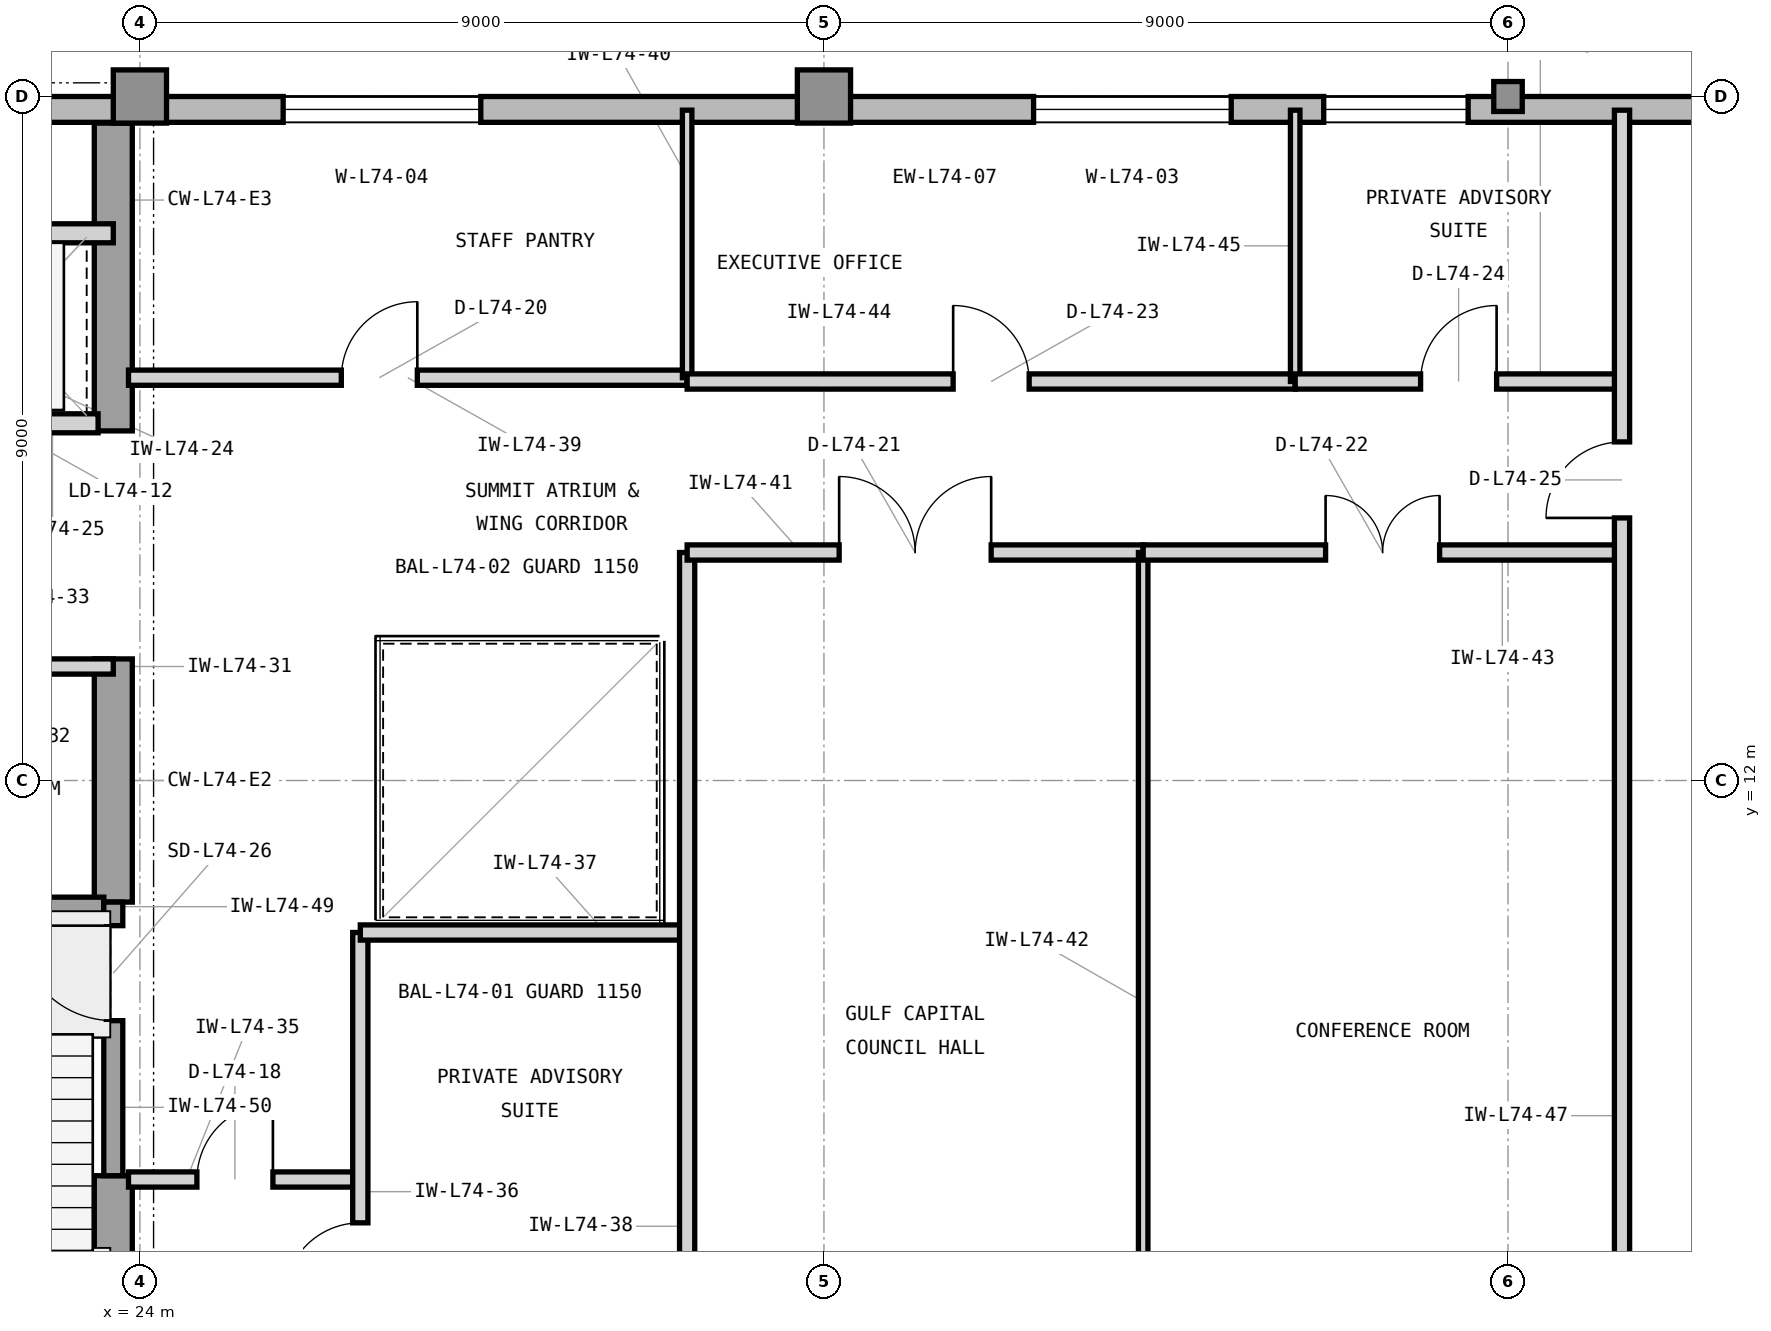
"""IFC4 building model, lengths in metres.
Left out: names, types, materials, properties, quantities, classifications, styles, units other than length and angle.
Written with IfcOpenShell. Run it as: python <this file> out.ifc"""

import sys

from ifc_helpers import new_model, si_unit, direction, frame, frame_2d, origin, origin_2d, place, context, subcontext, project, spatial, rectangle, i_section, extrude, element, fill, save


model = new_model("IFC4")
c1 = context("Model", 3, precision=1e-05, world=origin(), true_north=direction((0.0, 1.0)))
c2 = subcontext(c1, "Body", "Model", "MODEL_VIEW")
j1 = project(units=[si_unit("LENGTHUNIT", "METRE"), si_unit("PLANEANGLEUNIT", "RADIAN")], contexts=[c1])
p1 = place(None, origin())
s1 = spatial("IfcSite", under=j1, at=p1, CompositionType="ELEMENT")
p2 = place(p1, origin())
s2 = spatial("IfcBuilding", under=s1, at=p2, CompositionType="ELEMENT")
p3 = place(p2, frame((0.0, 0.0, 301.5)))
s3 = spatial("IfcBuildingStorey", under=s2, at=p3, CompositionType="ELEMENT", Elevation=301.5)
p4 = place(p3, frame((23.65, 3.6, 0.0), z_axis=(0.0, 0.0, 1.0), x_axis=(0.0, 1.0, 0.0)))
e1 = element("IfcWall", 1, at=p4, inside=s3, PredefinedType="SHEAR", context=c2, shape_type="SweptSolid", body=[
    extrude(rectangle(XDim=3.2, YDim=0.5, at=frame_2d((1.6, 0.0))), origin(), (0.0, 0.0, 1.0), 3.9),
])
p5 = place(p3, frame((23.65, 10.4, 0.0), z_axis=(0.0, 0.0, 1.0), x_axis=(0.0, 1.0, 0.0)))
e2 = element("IfcWall", 2, at=p5, inside=s3, PredefinedType="SHEAR", context=c2, shape_type="SweptSolid", body=[
    extrude(rectangle(XDim=3.2, YDim=0.5, at=frame_2d((1.6, 0.0))), origin(), (0.0, 0.0, 1.0), 3.9),
])
p6 = place(p3, frame((23.65, 16.6, 0.0), z_axis=(0.0, 0.0, 1.0), x_axis=(0.0, 1.0, 0.0)))
e3 = element("IfcWall", 3, at=p6, inside=s3, PredefinedType="SHEAR", context=c2, shape_type="SweptSolid", body=[
    extrude(rectangle(XDim=4.05, YDim=0.5, at=frame_2d((2.025, 0.0))), origin(), (0.0, 0.0, 1.0), 3.9),
])
for number, where, z_axis, x_axis in (
    (4, (24.0, 21.0, 0.0), (0.0, 0.0, 1.0), (1.0, 0.0, 0.0)),
    (5, (33.0, 21.0, 0.0), (0.0, 0.0, 1.0), (1.0, 0.0, 0.0)),
):
    element("IfcColumn", number, at=place(p3, frame(where, z_axis=z_axis, x_axis=x_axis)), inside=s3, PredefinedType="COLUMN", context=c2, shape_type="SweptSolid", body=[
        extrude(rectangle(XDim=0.7, YDim=0.7, at=origin_2d()), origin(), (0.0, 0.0, 1.0), 3.9),
    ])
p7 = place(p3, frame((42.0, 21.0, 0.0), z_axis=(0.0, 0.0, 1.0), x_axis=(1.0, 0.0, 0.0)))
e6 = element("IfcColumn", 6, at=p7, inside=s3, PredefinedType="COLUMN", context=c2, shape_type="SweptSolid", body=[
    extrude(i_section(OverallWidth=0.394, OverallDepth=0.375, WebThickness=0.017, FlangeThickness=0.028, FilletRadius=0.022, at=origin_2d()), origin(), (0.0, 0.0, 1.0), 3.9),
])
p8 = place(p3, frame((49.4, 20.83, 0.0), z_axis=(0.0, 0.0, 1.0), x_axis=(-1.0, 0.0, 0.0)))
e7 = element("IfcWall", 7, at=p8, inside=s3, PredefinedType="STANDARD", context=c2, shape_type="SweptSolid", body=[
    extrude(rectangle(XDim=29.62, YDim=0.34, at=frame_2d((14.81, 0.0))), origin(), (0.0, 0.0, 1.0), 3.715),
])
p9 = place(p8, frame((11.042, 0.0, 0.8)))
e8 = element("IfcOpeningElement", 8, at=p9, cuts=e7, PredefinedType="OPENING", context=c2, shape_type="SweptSolid", body=[
    extrude(rectangle(XDim=2.6, YDim=2.35, at=frame_2d((1.3, 1.175))), frame((0.0, 0.18, 0.0), z_axis=(0.0, -1.0, 0.0), x_axis=(1.0, 0.0, 0.0)), (0.0, 0.0, 1.0), 0.36),
])
p10 = place(p8, frame((20.915, 0.0, 0.8)))
e9 = element("IfcOpeningElement", 9, at=p10, cuts=e7, PredefinedType="OPENING", context=c2, shape_type="SweptSolid", body=[
    extrude(rectangle(XDim=2.6, YDim=2.35, at=frame_2d((1.3, 1.175))), frame((0.0, 0.18, 0.0), z_axis=(0.0, -1.0, 0.0), x_axis=(1.0, 0.0, 0.0)), (0.0, 0.0, 1.0), 0.36),
])
p11 = place(p8, frame((7.925, 0.0, 0.8)))
e10 = element("IfcOpeningElement", 10, at=p11, cuts=e7, PredefinedType="OPENING", context=c2, shape_type="SweptSolid", body=[
    extrude(rectangle(XDim=1.9, YDim=2.35, at=frame_2d((0.95, 1.175))), frame((0.0, 0.18, 0.0), z_axis=(0.0, -1.0, 0.0), x_axis=(1.0, 0.0, 0.0)), (0.0, 0.0, 1.0), 0.36),
])
p12 = place(p3, frame((21.05, 16.7, 0.0), z_axis=(0.0, 0.0, 1.0), x_axis=(1.0, 0.0, 0.0)))
e11 = element("IfcWall", 11, at=p12, inside=s3, PredefinedType="PARTITIONING", context=c2, shape_type="SweptSolid", body=[
    extrude(rectangle(XDim=2.4, YDim=0.25, at=frame_2d((1.2, 0.0))), origin(), (0.0, 0.0, 1.0), 3.354),
])
p13 = place(p12, frame((0.52, 0.0, 0.0)))
e12 = element("IfcOpeningElement", 12, at=p13, cuts=e11, PredefinedType="OPENING", context=c2, shape_type="SweptSolid", body=[
    extrude(rectangle(XDim=1.15, YDim=2.25, at=frame_2d((0.575, 1.125))), frame((0.0, 0.135, 0.0), z_axis=(0.0, -1.0, 0.0), x_axis=(1.0, 0.0, 0.0)), (0.0, 0.0, 1.0), 0.27),
])
p14 = place(p3, frame((16.45, 19.2, 0.0), z_axis=(0.0, 0.0, 1.0), x_axis=(1.0, 0.0, 0.0)))
e13 = element("IfcWall", 13, at=p14, inside=s3, PredefinedType="PARTITIONING", context=c2, shape_type="SweptSolid", body=[
    extrude(rectangle(XDim=7.2, YDim=0.25, at=frame_2d((3.6, 0.0))), origin(), (0.0, 0.0, 1.0), 3.705),
])
p15 = place(p3, frame((18.45, 13.5, 0.0), z_axis=(0.0, 0.0, 1.0), x_axis=(1.0, 0.0, 0.0)))
e14 = element("IfcWall", 14, at=p15, inside=s3, PredefinedType="PARTITIONING", context=c2, shape_type="SweptSolid", body=[
    extrude(rectangle(XDim=5.2, YDim=0.2, at=frame_2d((2.6, 0.0))), origin(), (0.0, 0.0, 1.0), 3.354),
])
p16 = place(p15, frame((2.125, 0.0, 0.0)))
e15 = element("IfcOpeningElement", 15, at=p16, cuts=e14, PredefinedType="OPENING", context=c2, shape_type="SweptSolid", body=[
    extrude(rectangle(XDim=0.95, YDim=2.1, at=frame_2d((0.475, 1.05))), frame((0.0, 0.11, 0.0), z_axis=(0.0, -1.0, 0.0), x_axis=(1.0, 0.0, 0.0)), (0.0, 0.0, 1.0), 0.22),
])
p17 = place(p3, frame((23.85, 6.75, 0.0), z_axis=(0.0, 0.0, 1.0), x_axis=(1.0, 0.0, 0.0)))
e16 = element("IfcWall", 16, at=p17, inside=s3, PredefinedType="PARTITIONING", context=c2, shape_type="SweptSolid", body=[
    extrude(rectangle(XDim=3.05, YDim=0.2, at=frame_2d((1.525, 0.0))), origin(), (0.0, 0.0, 1.0), 3.705),
])
p18 = place(p17, frame((0.9, 0.0, 0.0)))
e17 = element("IfcOpeningElement", 17, at=p18, cuts=e16, PredefinedType="OPENING", context=c2, shape_type="SweptSolid", body=[
    extrude(rectangle(XDim=1.0, YDim=2.15, at=frame_2d((0.5, 1.075))), frame((0.0, 0.11, 0.0), z_axis=(0.0, -1.0, 0.0), x_axis=(1.0, 0.0, 0.0)), (0.0, 0.0, 1.0), 0.22),
])
p19 = place(p3, frame((26.9, 3.18, 0.0), z_axis=(0.0, 0.0, 1.0), x_axis=(0.0, 1.0, 0.0)))
e18 = element("IfcWall", 18, at=p19, inside=s3, PredefinedType="PARTITIONING", context=c2, shape_type="SweptSolid", body=[
    extrude(rectangle(XDim=6.82, YDim=0.2, at=frame_2d((3.41, 0.0))), origin(), (0.0, 0.0, 1.0), 3.705),
])
p20 = place(p19, frame((2.0, 0.0, 0.0)))
e19 = element("IfcOpeningElement", 19, at=p20, cuts=e18, PredefinedType="OPENING", context=c2, shape_type="SweptSolid", body=[
    extrude(rectangle(XDim=1.0, YDim=2.15, at=frame_2d((0.5, 1.075))), frame((0.0, 0.11, 0.0), z_axis=(0.0, -1.0, 0.0), x_axis=(1.0, 0.0, 0.0)), (0.0, 0.0, 1.0), 0.22),
])
p21 = place(p3, frame((26.9, 10.0, 0.0), z_axis=(0.0, 0.0, 1.0), x_axis=(1.0, 0.0, 0.0)))
e20 = element("IfcWall", 20, at=p21, inside=s3, PredefinedType="PARTITIONING", context=c2, shape_type="SweptSolid", body=[
    extrude(rectangle(XDim=4.3, YDim=0.2, at=frame_2d((2.15, 0.0))), origin(), (0.0, 0.0, 1.0), 3.705),
])
p22 = place(p3, frame((31.2, 3.18, 0.0), z_axis=(0.0, 0.0, 1.0), x_axis=(0.0, 1.0, 0.0)))
e21 = element("IfcWall", 21, at=p22, inside=s3, PredefinedType="PARTITIONING", context=c2, shape_type="SweptSolid", body=[
    extrude(rectangle(XDim=11.82, YDim=0.2, at=frame_2d((5.91, 0.0))), origin(), (0.0, 0.0, 1.0), 3.705),
])
p23 = place(p3, frame((23.85, 17.3, 0.0), z_axis=(0.0, 0.0, 1.0), x_axis=(1.0, 0.0, 0.0)))
e22 = element("IfcWall", 22, at=p23, inside=s3, PredefinedType="PARTITIONING", context=c2, shape_type="SweptSolid", body=[
    extrude(rectangle(XDim=7.35, YDim=0.2, at=frame_2d((3.675, 0.0))), origin(), (0.0, 0.0, 1.0), 3.705),
])
p24 = place(p23, frame((2.8, 0.0, 0.0)))
e23 = element("IfcOpeningElement", 23, at=p24, cuts=e22, PredefinedType="OPENING", context=c2, shape_type="SweptSolid", body=[
    extrude(rectangle(XDim=1.0, YDim=2.15, at=frame_2d((0.5, 1.075))), frame((0.0, 0.11, 0.0), z_axis=(0.0, -1.0, 0.0), x_axis=(1.0, 0.0, 0.0)), (0.0, 0.0, 1.0), 0.22),
])
p25 = place(p3, frame((31.2, 17.3, 0.0), z_axis=(0.0, 0.0, 1.0), x_axis=(0.0, 1.0, 0.0)))
e24 = element("IfcWall", 24, at=p25, inside=s3, PredefinedType="PARTITIONING", context=c2, shape_type="SweptSolid", body=[
    extrude(rectangle(XDim=3.52, YDim=0.125, at=frame_2d((1.76, 0.0))), origin(), (0.0, 0.0, 1.0), 3.705),
])
p26 = place(p3, frame((31.2, 15.0, 0.0), z_axis=(0.0, 0.0, 1.0), x_axis=(1.0, 0.0, 0.0)))
e25 = element("IfcWall", 25, at=p26, inside=s3, PredefinedType="PARTITIONING", context=c2, shape_type="SweptSolid", body=[
    extrude(rectangle(XDim=6.0, YDim=0.2, at=frame_2d((3.0, 0.0))), origin(), (0.0, 0.0, 1.0), 3.354),
])
p27 = place(p26, frame((2.0, 0.0, 0.0)))
e26 = element("IfcOpeningElement", 26, at=p27, cuts=e25, PredefinedType="OPENING", context=c2, shape_type="SweptSolid", body=[
    extrude(rectangle(XDim=2.0, YDim=2.5, at=frame_2d((1.0, 1.25))), frame((0.0, 0.11, 0.0), z_axis=(0.0, -1.0, 0.0), x_axis=(1.0, 0.0, 0.0)), (0.0, 0.0, 1.0), 0.22),
])
p28 = place(p3, frame((37.2, 3.18, 0.0), z_axis=(0.0, 0.0, 1.0), x_axis=(0.0, 1.0, 0.0)))
e27 = element("IfcWall", 27, at=p28, inside=s3, PredefinedType="PARTITIONING", context=c2, shape_type="SweptSolid", body=[
    extrude(rectangle(XDim=11.82, YDim=0.125, at=frame_2d((5.91, 0.0))), origin(), (0.0, 0.0, 1.0), 3.705),
])
p29 = place(p3, frame((37.2, 15.0, 0.0), z_axis=(0.0, 0.0, 1.0), x_axis=(1.0, 0.0, 0.0)))
e28 = element("IfcWall", 28, at=p29, inside=s3, PredefinedType="PARTITIONING", context=c2, shape_type="SweptSolid", body=[
    extrude(rectangle(XDim=6.3, YDim=0.2, at=frame_2d((3.15, 0.0))), origin(), (0.0, 0.0, 1.0), 3.354),
])
p30 = place(p29, frame((2.4, 0.0, 0.0)))
e29 = element("IfcOpeningElement", 29, at=p30, cuts=e28, PredefinedType="OPENING", context=c2, shape_type="SweptSolid", body=[
    extrude(rectangle(XDim=1.5, YDim=2.3, at=frame_2d((0.75, 1.15))), frame((0.0, 0.11, 0.0), z_axis=(0.0, -1.0, 0.0), x_axis=(1.0, 0.0, 0.0)), (0.0, 0.0, 1.0), 0.22),
])
p31 = place(p3, frame((31.2, 17.25, 0.0), z_axis=(0.0, 0.0, 1.0), x_axis=(1.0, 0.0, 0.0)))
e30 = element("IfcWall", 30, at=p31, inside=s3, PredefinedType="PARTITIONING", context=c2, shape_type="SweptSolid", body=[
    extrude(rectangle(XDim=8.0, YDim=0.2, at=frame_2d((4.0, 0.0))), origin(), (0.0, 0.0, 1.0), 3.705),
])
p32 = place(p31, frame((3.5, 0.0, 0.0)))
e31 = element("IfcOpeningElement", 31, at=p32, cuts=e30, PredefinedType="OPENING", context=c2, shape_type="SweptSolid", body=[
    extrude(rectangle(XDim=1.0, YDim=2.15, at=frame_2d((0.5, 1.075))), frame((0.0, 0.11, 0.0), z_axis=(0.0, -1.0, 0.0), x_axis=(1.0, 0.0, 0.0)), (0.0, 0.0, 1.0), 0.22),
])
p33 = place(p3, frame((39.2, 17.25, 0.0), z_axis=(0.0, 0.0, 1.0), x_axis=(0.0, 1.0, 0.0)))
e32 = element("IfcWall", 32, at=p33, inside=s3, PredefinedType="PARTITIONING", context=c2, shape_type="SweptSolid", body=[
    extrude(rectangle(XDim=3.57, YDim=0.125, at=frame_2d((1.785, 0.0))), origin(), (0.0, 0.0, 1.0), 3.705),
])
p34 = place(p3, frame((39.2, 17.25, 0.0), z_axis=(0.0, 0.0, 1.0), x_axis=(1.0, 0.0, 0.0)))
e33 = element("IfcWall", 33, at=p34, inside=s3, PredefinedType="PARTITIONING", context=c2, shape_type="SweptSolid", body=[
    extrude(rectangle(XDim=4.3, YDim=0.2, at=frame_2d((2.15, 0.0))), origin(), (0.0, 0.0, 1.0), 3.705),
])
p35 = place(p34, frame((1.65, 0.0, 0.0)))
e34 = element("IfcOpeningElement", 34, at=p35, cuts=e33, PredefinedType="OPENING", context=c2, shape_type="SweptSolid", body=[
    extrude(rectangle(XDim=1.0, YDim=2.15, at=frame_2d((0.5, 1.075))), frame((0.0, 0.11, 0.0), z_axis=(0.0, -1.0, 0.0), x_axis=(1.0, 0.0, 0.0)), (0.0, 0.0, 1.0), 0.22),
])
p36 = place(p3, frame((43.5, 3.18, 0.0), z_axis=(0.0, 0.0, 1.0), x_axis=(0.0, 1.0, 0.0)))
e35 = element("IfcWall", 35, at=p36, inside=s3, PredefinedType="PARTITIONING", context=c2, shape_type="SweptSolid", body=[
    extrude(rectangle(XDim=17.64, YDim=0.2, at=frame_2d((8.82, 0.0))), origin(), (0.0, 0.0, 1.0), 3.705),
])
p37 = place(p36, frame((12.275, 0.0, 0.0)))
e36 = element("IfcOpeningElement", 36, at=p37, cuts=e35, PredefinedType="OPENING", context=c2, shape_type="SweptSolid", body=[
    extrude(rectangle(XDim=1.0, YDim=2.15, at=frame_2d((0.5, 1.075))), frame((0.0, 0.11, 0.0), z_axis=(0.0, -1.0, 0.0), x_axis=(1.0, 0.0, 0.0)), (0.0, 0.0, 1.0), 0.22),
])
p38 = place(p3, frame((19.705, 10.34, 0.0), z_axis=(0.0, 0.0, 1.0), x_axis=(1.0, 0.0, 0.0)))
e37 = element("IfcWall", 37, at=p38, inside=s3, PredefinedType="SHEAR", context=c2, shape_type="SweptSolid", body=[
    extrude(rectangle(XDim=3.82, YDim=0.25, at=frame_2d((1.91, 0.0))), origin(), (0.0, 0.0, 1.0), 3.9),
])
p39 = place(p3, frame((23.65, 6.8, 0.0), z_axis=(0.0, 0.0, 1.0), x_axis=(0.0, 1.0, 0.0)))
e38 = element("IfcWall", 38, at=p39, inside=s3, PredefinedType="SHEAR", context=c2, shape_type="SweptSolid", body=[
    extrude(rectangle(XDim=3.6, YDim=0.25, at=frame_2d((1.8, 0.0))), origin(), (0.0, 0.0, 1.0), 3.9),
])
p40 = place(p39, frame((2.04, 0.0, 0.0)))
e39 = element("IfcOpeningElement", 39, at=p40, cuts=e38, PredefinedType="OPENING", context=c2, shape_type="SweptSolid", body=[
    extrude(rectangle(XDim=1.25, YDim=2.2, at=frame_2d((0.625, 1.1))), frame((0.0, 0.135, 0.0), z_axis=(0.0, -1.0, 0.0), x_axis=(1.0, 0.0, 0.0)), (0.0, 0.0, 1.0), 0.27),
])
p41 = place(p9, origin())
e40 = element("IfcWindow", 40, at=p41, inside=s3, PartitioningType="SINGLE_PANEL", PredefinedType="WINDOW", context=c2, shape_type="SweptSolid", body=[
    extrude(rectangle(XDim=2.6, YDim=2.35, at=frame_2d((1.3, 1.175))), frame((0.0, 0.11, 0.0), z_axis=(0.0, -1.0, 0.0), x_axis=(1.0, 0.0, 0.0)), (0.0, 0.0, 1.0), 0.06),
])
fill(e8, e40)
p42 = place(p10, origin())
e41 = element("IfcWindow", 41, at=p42, inside=s3, PartitioningType="SINGLE_PANEL", PredefinedType="WINDOW", context=c2, shape_type="SweptSolid", body=[
    extrude(rectangle(XDim=2.6, YDim=2.35, at=frame_2d((1.3, 1.175))), frame((0.0, 0.11, 0.0), z_axis=(0.0, -1.0, 0.0), x_axis=(1.0, 0.0, 0.0)), (0.0, 0.0, 1.0), 0.06),
])
fill(e9, e41)
p43 = place(p18, origin())
e42 = element("IfcDoor", 42, at=p43, inside=s3, OperationType="SINGLE_SWING_RIGHT", PredefinedType="DOOR", context=c2, shape_type="SweptSolid", body=[
    extrude(rectangle(XDim=1.0, YDim=2.15, at=frame_2d((0.5, 1.075))), frame((0.0, 0.025, 0.0), z_axis=(0.0, -1.0, 0.0), x_axis=(1.0, 0.0, 0.0)), (0.0, 0.0, 1.0), 0.05),
])
fill(e17, e42)
p44 = place(p20, origin())
e43 = element("IfcDoor", 43, at=p44, inside=s3, OperationType="SINGLE_SWING_LEFT", PredefinedType="DOOR", context=c2, shape_type="SweptSolid", body=[
    extrude(rectangle(XDim=1.0, YDim=2.15, at=frame_2d((0.5, 1.075))), frame((0.0, 0.025, 0.0), z_axis=(0.0, -1.0, 0.0), x_axis=(1.0, 0.0, 0.0)), (0.0, 0.0, 1.0), 0.05),
])
fill(e19, e43)
p45 = place(p24, origin())
e44 = element("IfcDoor", 44, at=p45, inside=s3, OperationType="SINGLE_SWING_RIGHT", PredefinedType="DOOR", context=c2, shape_type="SweptSolid", body=[
    extrude(rectangle(XDim=1.0, YDim=2.15, at=frame_2d((0.5, 1.075))), frame((0.0, 0.025, 0.0), z_axis=(0.0, -1.0, 0.0), x_axis=(1.0, 0.0, 0.0)), (0.0, 0.0, 1.0), 0.05),
])
fill(e23, e44)
p46 = place(p27, origin())
e45 = element("IfcDoor", 45, at=p46, inside=s3, OperationType="DOUBLE_DOOR_SINGLE_SWING", PredefinedType="DOOR", context=c2, shape_type="SweptSolid", body=[
    extrude(rectangle(XDim=2.0, YDim=2.5, at=frame_2d((1.0, 1.25))), frame((0.0, 0.025, 0.0), z_axis=(0.0, -1.0, 0.0), x_axis=(1.0, 0.0, 0.0)), (0.0, 0.0, 1.0), 0.05),
])
fill(e26, e45)
p47 = place(p30, origin())
e46 = element("IfcDoor", 46, at=p47, inside=s3, OperationType="DOUBLE_DOOR_SINGLE_SWING", PredefinedType="DOOR", context=c2, shape_type="SweptSolid", body=[
    extrude(rectangle(XDim=1.5, YDim=2.3, at=frame_2d((0.75, 1.15))), frame((0.0, 0.025, 0.0), z_axis=(0.0, -1.0, 0.0), x_axis=(1.0, 0.0, 0.0)), (0.0, 0.0, 1.0), 0.05),
])
fill(e29, e46)
p48 = place(p32, origin())
e47 = element("IfcDoor", 47, at=p48, inside=s3, OperationType="SINGLE_SWING_LEFT", PredefinedType="DOOR", context=c2, shape_type="SweptSolid", body=[
    extrude(rectangle(XDim=1.0, YDim=2.15, at=frame_2d((0.5, 1.075))), frame((0.0, 0.025, 0.0), z_axis=(0.0, -1.0, 0.0), x_axis=(1.0, 0.0, 0.0)), (0.0, 0.0, 1.0), 0.05),
])
fill(e31, e47)
p49 = place(p35, origin())
e48 = element("IfcDoor", 48, at=p49, inside=s3, OperationType="SINGLE_SWING_RIGHT", PredefinedType="DOOR", context=c2, shape_type="SweptSolid", body=[
    extrude(rectangle(XDim=1.0, YDim=2.15, at=frame_2d((0.5, 1.075))), frame((0.0, 0.025, 0.0), z_axis=(0.0, -1.0, 0.0), x_axis=(1.0, 0.0, 0.0)), (0.0, 0.0, 1.0), 0.05),
])
fill(e34, e48)
p50 = place(p37, origin())
e49 = element("IfcDoor", 49, at=p50, inside=s3, OperationType="SINGLE_SWING_LEFT", PredefinedType="DOOR", context=c2, shape_type="SweptSolid", body=[
    extrude(rectangle(XDim=1.0, YDim=2.15, at=frame_2d((0.5, 1.075))), frame((0.0, 0.025, 0.0), z_axis=(0.0, -1.0, 0.0), x_axis=(1.0, 0.0, 0.0)), (0.0, 0.0, 1.0), 0.05),
])
fill(e36, e49)
p51 = place(p40, origin())
e50 = element("IfcDoor", 50, at=p51, inside=s3, OperationType="SINGLE_SWING_RIGHT", PredefinedType="DOOR", context=c2, shape_type="SweptSolid", body=[
    extrude(rectangle(XDim=1.25, YDim=2.2, at=frame_2d((0.625, 1.1))), frame((0.0, 0.025, 0.0), z_axis=(0.0, -1.0, 0.0), x_axis=(1.0, 0.0, 0.0)), (0.0, 0.0, 1.0), 0.05),
])
fill(e39, e50)
p52 = place(p11, origin())
e51 = element("IfcWindow", 51, at=p52, inside=s3, PartitioningType="SINGLE_PANEL", PredefinedType="WINDOW", context=c2, shape_type="SweptSolid", body=[
    extrude(rectangle(XDim=1.9, YDim=2.35, at=frame_2d((0.95, 1.175))), frame((0.0, 0.11, 0.0), z_axis=(0.0, -1.0, 0.0), x_axis=(1.0, 0.0, 0.0)), (0.0, 0.0, 1.0), 0.06),
])
fill(e10, e51)
save(model, sys.argv[1])
